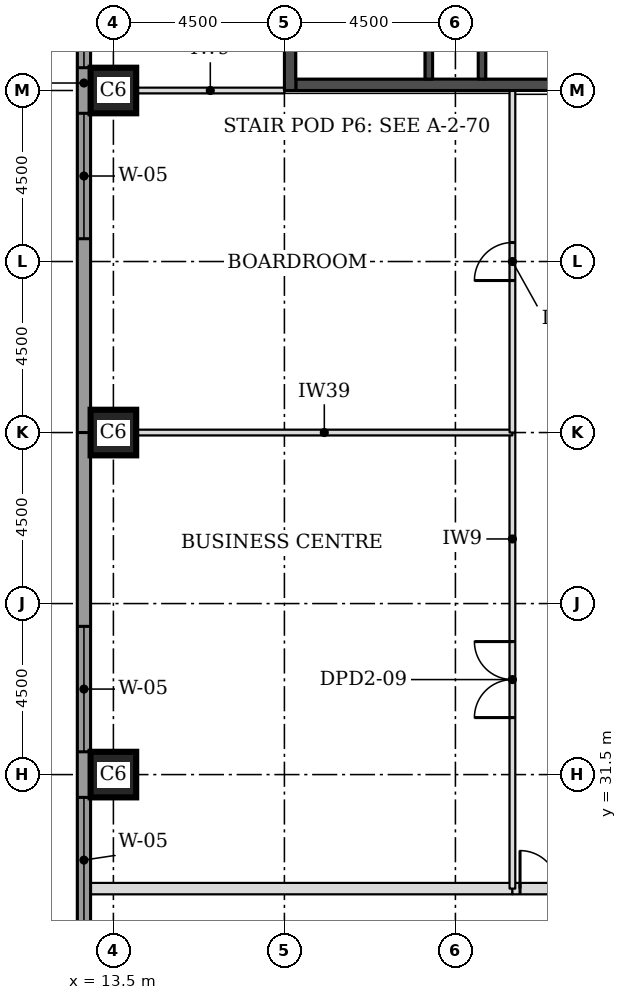
"""IFC4 building model, lengths in metres.
Left out: names, types, materials, properties, quantities, classifications, styles, units other than length and angle.
Written with IfcOpenShell. Run it as: python <this file> out.ifc"""

import sys

from ifc_helpers import new_model, si_unit, direction, frame, frame_2d, origin, origin_2d, place, context, subcontext, project, spatial, rectangle, extrude, element, fill, save


model = new_model("IFC4")
c1 = context("Model", 3, precision=1e-05, world=origin(), true_north=direction((0.0, 1.0)))
c2 = subcontext(c1, "Body", "Model", "MODEL_VIEW")
j1 = project(units=[si_unit("LENGTHUNIT", "METRE"), si_unit("PLANEANGLEUNIT", "RADIAN")], contexts=[c1])
p1 = place(None, origin())
s1 = spatial("IfcSite", under=j1, at=p1, CompositionType="ELEMENT")
p2 = place(p1, origin())
s2 = spatial("IfcBuilding", under=s1, at=p2, CompositionType="ELEMENT")
p3 = place(p2, frame((0.0, 0.0, 13.5)))
s3 = spatial("IfcBuildingStorey", under=s2, at=p3, CompositionType="ELEMENT", Elevation=13.5)
for number, where, z_axis, x_axis in (
    (1, (13.5, 31.5, 0.0), (0.0, 0.0, 1.0), (1.0, 0.0, 0.0)),
    (2, (13.5, 40.5, 0.0), (0.0, 0.0, 1.0), (1.0, 0.0, 0.0)),
    (3, (13.5, 49.5, 0.0), (0.0, 0.0, 1.0), (1.0, 0.0, 0.0)),
):
    element("IfcColumn", number, at=place(p3, frame(where, z_axis=z_axis, x_axis=x_axis)), inside=s3, PredefinedType="COLUMN", context=c2, shape_type="SweptSolid", body=[
        extrude(rectangle(XDim=1.2, YDim=1.2, at=origin_2d()), origin(), (0.0, 0.0, 1.0), 5.0),
    ])
p4 = place(p3, frame((18.3, 49.65, 0.0), z_axis=(0.0, 0.0, 1.0), x_axis=(1.0, 0.0, 0.0)))
e4 = element("IfcWall", 4, at=p4, inside=s3, PredefinedType="SHEAR", context=c2, shape_type="SweptSolid", body=[
    extrude(rectangle(XDim=8.4, YDim=0.3, at=frame_2d((4.2, 0.0))), origin(), (0.0, 0.0, 1.0), 5.0),
])
p5 = place(p3, frame((18.15, 49.5, 0.0), z_axis=(0.0, 0.0, 1.0), x_axis=(0.0, 1.0, 0.0)))
e5 = element("IfcWall", 5, at=p5, inside=s3, PredefinedType="SHEAR", context=c2, shape_type="SweptSolid", body=[
    extrude(rectangle(XDim=9.0, YDim=0.3, at=frame_2d((4.5, 0.0))), origin(), (0.0, 0.0, 1.0), 5.0),
])
p6 = place(p3, frame((12.725, 58.894, 0.0), z_axis=(0.0, 0.0, 1.0), x_axis=(0.0, -1.0, 0.0)))
e6 = element("IfcWall", 6, at=p6, inside=s3, PredefinedType="STANDARD", context=c2, shape_type="SweptSolid", body=[
    extrude(rectangle(XDim=18.394, YDim=0.35, at=frame_2d((9.197, 0.0))), origin(), (0.0, 0.0, 1.0), 4.755),
])
p7 = place(p6, frame((5.493, 0.0, 0.9)))
e7 = element("IfcOpeningElement", 7, at=p7, cuts=e6, PredefinedType="OPENING", context=c2, shape_type="SweptSolid", body=[
    extrude(rectangle(XDim=3.3, YDim=3.1, at=frame_2d((1.65, 1.55))), frame((0.0, 0.185, 0.0), z_axis=(0.0, -1.0, 0.0), x_axis=(1.0, 0.0, 0.0)), (0.0, 0.0, 1.0), 0.37),
])
p8 = place(p6, frame((9.993, 0.0, 0.9)))
e8 = element("IfcOpeningElement", 8, at=p8, cuts=e6, PredefinedType="OPENING", context=c2, shape_type="SweptSolid", body=[
    extrude(rectangle(XDim=3.3, YDim=3.1, at=frame_2d((1.65, 1.55))), frame((0.0, 0.185, 0.0), z_axis=(0.0, -1.0, 0.0), x_axis=(1.0, 0.0, 0.0)), (0.0, 0.0, 1.0), 0.37),
])
p9 = place(p3, frame((12.725, 40.5, 0.0), z_axis=(0.0, 0.0, 1.0), x_axis=(0.0, -1.0, 0.0)))
e9 = element("IfcWall", 9, at=p9, inside=s3, PredefinedType="STANDARD", context=c2, shape_type="SweptSolid", body=[
    extrude(rectangle(XDim=18.394, YDim=0.35, at=frame_2d((9.197, 0.0))), origin(), (0.0, 0.0, 1.0), 4.755),
])
p10 = place(p9, frame((5.1, 0.0, 0.9)))
e10 = element("IfcOpeningElement", 10, at=p10, cuts=e9, PredefinedType="OPENING", context=c2, shape_type="SweptSolid", body=[
    extrude(rectangle(XDim=3.3, YDim=3.1, at=frame_2d((1.65, 1.55))), frame((0.0, 0.185, 0.0), z_axis=(0.0, -1.0, 0.0), x_axis=(1.0, 0.0, 0.0)), (0.0, 0.0, 1.0), 0.37),
])
p11 = place(p9, frame((9.6, 0.0, 0.9)))
e11 = element("IfcOpeningElement", 11, at=p11, cuts=e9, PredefinedType="OPENING", context=c2, shape_type="SweptSolid", body=[
    extrude(rectangle(XDim=3.3, YDim=3.1, at=frame_2d((1.65, 1.55))), frame((0.0, 0.185, 0.0), z_axis=(0.0, -1.0, 0.0), x_axis=(1.0, 0.0, 0.0)), (0.0, 0.0, 1.0), 0.37),
])
p12 = place(p3, frame((12.9, 28.5, 0.0), z_axis=(0.0, 0.0, 1.0), x_axis=(1.0, 0.0, 0.0)))
e12 = element("IfcWall", 12, at=p12, inside=s3, PredefinedType="PARTITIONING", context=c2, shape_type="SweptSolid", body=[
    extrude(rectangle(XDim=11.1, YDim=0.3, at=frame_2d((5.55, 0.0))), origin(), (0.0, 0.0, 1.0), 4.78),
])
p13 = place(p3, frame((24.0, 28.5, 0.0), z_axis=(0.0, 0.0, 1.0), x_axis=(1.0, 0.0, 0.0)))
e13 = element("IfcWall", 13, at=p13, inside=s3, PredefinedType="PARTITIONING", context=c2, shape_type="SweptSolid", body=[
    extrude(rectangle(XDim=44.0, YDim=0.3, at=frame_2d((22.0, 0.0))), origin(), (0.0, 0.0, 1.0), 4.78),
])
p14 = place(p13, frame((0.2, 0.0, 0.0)))
e14 = element("IfcOpeningElement", 14, at=p14, cuts=e13, PredefinedType="OPENING", context=c2, shape_type="SweptSolid", body=[
    extrude(rectangle(XDim=2.0, YDim=2.1, at=frame_2d((1.0, 1.05))), frame((0.0, 0.16, 0.0), z_axis=(0.0, -1.0, 0.0), x_axis=(1.0, 0.0, 0.0)), (0.0, 0.0, 1.0), 0.32),
])
p15 = place(p13, frame((5.0, 0.0, 0.0)))
e15 = element("IfcOpeningElement", 15, at=p15, cuts=e13, PredefinedType="OPENING", context=c2, shape_type="SweptSolid", body=[
    extrude(rectangle(XDim=2.0, YDim=2.1, at=frame_2d((1.0, 1.05))), frame((0.0, 0.16, 0.0), z_axis=(0.0, -1.0, 0.0), x_axis=(1.0, 0.0, 0.0)), (0.0, 0.0, 1.0), 0.32),
])
p16 = place(p13, frame((13.0, 0.0, 0.0)))
e16 = element("IfcOpeningElement", 16, at=p16, cuts=e13, PredefinedType="OPENING", context=c2, shape_type="SweptSolid", body=[
    extrude(rectangle(XDim=2.0, YDim=2.1, at=frame_2d((1.0, 1.05))), frame((0.0, 0.16, 0.0), z_axis=(0.0, -1.0, 0.0), x_axis=(1.0, 0.0, 0.0)), (0.0, 0.0, 1.0), 0.32),
])
p17 = place(p13, frame((19.0, 0.0, 0.0)))
e17 = element("IfcOpeningElement", 17, at=p17, cuts=e13, PredefinedType="OPENING", context=c2, shape_type="SweptSolid", body=[
    extrude(rectangle(XDim=2.0, YDim=2.1, at=frame_2d((1.0, 1.05))), frame((0.0, 0.16, 0.0), z_axis=(0.0, -1.0, 0.0), x_axis=(1.0, 0.0, 0.0)), (0.0, 0.0, 1.0), 0.32),
])
p18 = place(p13, frame((37.0, 0.0, 0.0)))
e18 = element("IfcOpeningElement", 18, at=p18, cuts=e13, PredefinedType="OPENING", context=c2, shape_type="SweptSolid", body=[
    extrude(rectangle(XDim=2.0, YDim=2.1, at=frame_2d((1.0, 1.05))), frame((0.0, 0.16, 0.0), z_axis=(0.0, -1.0, 0.0), x_axis=(1.0, 0.0, 0.0)), (0.0, 0.0, 1.0), 0.32),
])
p19 = place(p13, frame((29.0, 0.0, 0.0)))
e19 = element("IfcOpeningElement", 19, at=p19, cuts=e13, PredefinedType="OPENING", context=c2, shape_type="SweptSolid", body=[
    extrude(rectangle(XDim=2.0, YDim=2.1, at=frame_2d((1.0, 1.05))), frame((0.0, 0.16, 0.0), z_axis=(0.0, -1.0, 0.0), x_axis=(1.0, 0.0, 0.0)), (0.0, 0.0, 1.0), 0.32),
])
p20 = place(p3, frame((24.0, 28.5, 0.0), z_axis=(0.0, 0.0, 1.0), x_axis=(0.0, 1.0, 0.0)))
e20 = element("IfcWall", 20, at=p20, inside=s3, PredefinedType="PARTITIONING", context=c2, shape_type="SweptSolid", body=[
    extrude(rectangle(XDim=12.0, YDim=0.15, at=frame_2d((6.0, 0.0))), origin(), (0.0, 0.0, 1.0), 4.78),
])
p21 = place(p20, frame((4.5, 0.0, 0.0)))
e21 = element("IfcOpeningElement", 21, at=p21, cuts=e20, PredefinedType="OPENING", context=c2, shape_type="SweptSolid", body=[
    extrude(rectangle(XDim=2.0, YDim=2.1, at=frame_2d((1.0, 1.05))), frame((0.0, 0.085, 0.0), z_axis=(0.0, -1.0, 0.0), x_axis=(1.0, 0.0, 0.0)), (0.0, 0.0, 1.0), 0.17),
])
p22 = place(p3, frame((14.1, 40.5, 0.0), z_axis=(0.0, 0.0, 1.0), x_axis=(1.0, 0.0, 0.0)))
e22 = element("IfcWall", 22, at=p22, inside=s3, PredefinedType="PARTITIONING", context=c2, shape_type="SweptSolid", body=[
    extrude(rectangle(XDim=9.9, YDim=0.15, at=frame_2d((4.95, 0.0))), origin(), (0.0, 0.0, 1.0), 3.78),
])
p23 = place(p3, frame((24.0, 40.5, 0.0), z_axis=(0.0, 0.0, 1.0), x_axis=(0.0, 1.0, 0.0)))
e23 = element("IfcWall", 23, at=p23, inside=s3, PredefinedType="PARTITIONING", context=c2, shape_type="SweptSolid", body=[
    extrude(rectangle(XDim=9.0, YDim=0.15, at=frame_2d((4.5, 0.0))), origin(), (0.0, 0.0, 1.0), 4.78),
])
p24 = place(p23, frame((4.0, 0.0, 0.0)))
e24 = element("IfcOpeningElement", 24, at=p24, cuts=e23, PredefinedType="OPENING", context=c2, shape_type="SweptSolid", body=[
    extrude(rectangle(XDim=1.0, YDim=2.1, at=frame_2d((0.5, 1.05))), frame((0.0, 0.085, 0.0), z_axis=(0.0, -1.0, 0.0), x_axis=(1.0, 0.0, 0.0)), (0.0, 0.0, 1.0), 0.17),
])
p25 = place(p3, frame((14.1, 49.5, 0.0), z_axis=(0.0, 0.0, 1.0), x_axis=(1.0, 0.0, 0.0)))
e25 = element("IfcWall", 25, at=p25, inside=s3, PredefinedType="PARTITIONING", context=c2, shape_type="SweptSolid", body=[
    extrude(rectangle(XDim=3.9, YDim=0.15, at=frame_2d((1.95, 0.0))), origin(), (0.0, 0.0, 1.0), 4.78),
])
for number, where, z_axis, x_axis in (
    (26, (21.8, 49.8, 0.0), (0.0, 0.0, 1.0), (0.0, 1.0, 0.0)),
    (27, (23.2, 49.8, 0.0), (0.0, 0.0, 1.0), (0.0, 1.0, 0.0)),
):
    element("IfcWall", number, at=place(p3, frame(where, z_axis=z_axis, x_axis=x_axis)), inside=s3, PredefinedType="SOLIDWALL", context=c2, shape_type="SweptSolid", body=[
        extrude(rectangle(XDim=6.05, YDim=0.2, at=frame_2d((3.025, 0.0))), origin(), (0.0, 0.0, 1.0), 4.78),
    ])
p26 = place(p7, origin())
e28 = element("IfcWindow", 28, at=p26, inside=s3, PartitioningType="SINGLE_PANEL", PredefinedType="WINDOW", context=c2, shape_type="SweptSolid", body=[
    extrude(rectangle(XDim=3.3, YDim=3.1, at=frame_2d((1.65, 1.55))), frame((0.0, 0.085, 0.0), z_axis=(0.0, -1.0, 0.0), x_axis=(1.0, 0.0, 0.0)), (0.0, 0.0, 1.0), 0.06),
])
fill(e7, e28)
p27 = place(p8, origin())
e29 = element("IfcWindow", 29, at=p27, inside=s3, PartitioningType="SINGLE_PANEL", PredefinedType="WINDOW", context=c2, shape_type="SweptSolid", body=[
    extrude(rectangle(XDim=3.3, YDim=3.1, at=frame_2d((1.65, 1.55))), frame((0.0, 0.085, 0.0), z_axis=(0.0, -1.0, 0.0), x_axis=(1.0, 0.0, 0.0)), (0.0, 0.0, 1.0), 0.06),
])
fill(e8, e29)
p28 = place(p10, origin())
e30 = element("IfcWindow", 30, at=p28, inside=s3, PartitioningType="SINGLE_PANEL", PredefinedType="WINDOW", context=c2, shape_type="SweptSolid", body=[
    extrude(rectangle(XDim=3.3, YDim=3.1, at=frame_2d((1.65, 1.55))), frame((0.0, 0.085, 0.0), z_axis=(0.0, -1.0, 0.0), x_axis=(1.0, 0.0, 0.0)), (0.0, 0.0, 1.0), 0.06),
])
fill(e10, e30)
p29 = place(p11, origin())
e31 = element("IfcWindow", 31, at=p29, inside=s3, PartitioningType="SINGLE_PANEL", PredefinedType="WINDOW", context=c2, shape_type="SweptSolid", body=[
    extrude(rectangle(XDim=3.3, YDim=3.1, at=frame_2d((1.65, 1.55))), frame((0.0, 0.085, 0.0), z_axis=(0.0, -1.0, 0.0), x_axis=(1.0, 0.0, 0.0)), (0.0, 0.0, 1.0), 0.06),
])
fill(e11, e31)
p30 = place(p14, origin())
e32 = element("IfcDoor", 32, at=p30, inside=s3, OperationType="DOUBLE_DOOR_SINGLE_SWING", PredefinedType="DOOR", context=c2, shape_type="SweptSolid", body=[
    extrude(rectangle(XDim=2.0, YDim=2.1, at=frame_2d((1.0, 1.05))), frame((0.0, 0.025, 0.0), z_axis=(0.0, -1.0, 0.0), x_axis=(1.0, 0.0, 0.0)), (0.0, 0.0, 1.0), 0.05),
])
fill(e14, e32)
p31 = place(p21, origin())
e33 = element("IfcDoor", 33, at=p31, inside=s3, OperationType="DOUBLE_DOOR_SINGLE_SWING", PredefinedType="DOOR", context=c2, shape_type="SweptSolid", body=[
    extrude(rectangle(XDim=2.0, YDim=2.1, at=frame_2d((1.0, 1.05))), frame((0.0, 0.025, 0.0), z_axis=(0.0, -1.0, 0.0), x_axis=(1.0, 0.0, 0.0)), (0.0, 0.0, 1.0), 0.05),
])
fill(e21, e33)
p32 = place(p24, origin())
e34 = element("IfcDoor", 34, at=p32, inside=s3, OperationType="SINGLE_SWING_LEFT", PredefinedType="DOOR", context=c2, shape_type="SweptSolid", body=[
    extrude(rectangle(XDim=1.0, YDim=2.1, at=frame_2d((0.5, 1.05))), frame((0.0, 0.025, 0.0), z_axis=(0.0, -1.0, 0.0), x_axis=(1.0, 0.0, 0.0)), (0.0, 0.0, 1.0), 0.05),
])
fill(e24, e34)
save(model, sys.argv[1])
